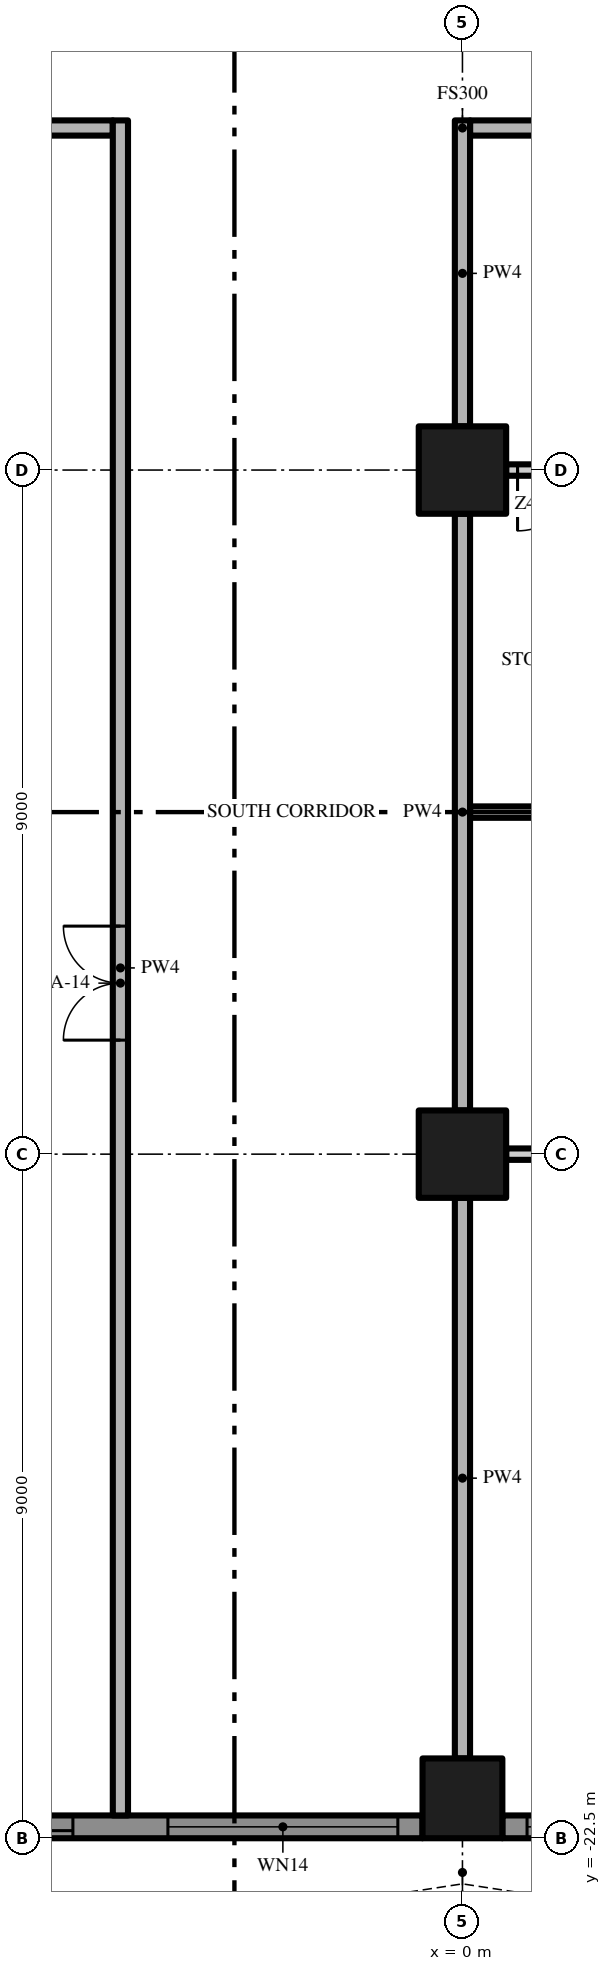
"""IFC4 building model, lengths in metres.
Left out: names, types, materials, properties, quantities, classifications, styles, units other than length and angle.
Written with IfcOpenShell. Run it as: python <this file> out.ifc"""

import sys

from ifc_helpers import new_model, si_unit, direction, frame, frame_2d, origin, origin_2d, place, context, subcontext, project, spatial, polyline, rectangle, outline, extrude, element, fill, save


model = new_model("IFC4")
c1 = context("Model", 3, precision=1e-05, world=origin(), true_north=direction((0.0, 1.0)))
c2 = subcontext(c1, "Body", "Model", "MODEL_VIEW")
j1 = project(units=[si_unit("LENGTHUNIT", "METRE"), si_unit("PLANEANGLEUNIT", "RADIAN")], contexts=[c1])
p1 = place(None, origin())
s1 = spatial("IfcSite", under=j1, at=p1, CompositionType="ELEMENT")
p2 = place(p1, origin())
s2 = spatial("IfcBuilding", under=s1, at=p2, CompositionType="ELEMENT")
p3 = place(p2, frame((0.0, 0.0, 188.2)))
s3 = spatial("IfcBuildingStorey", under=s2, at=p3, CompositionType="ELEMENT", Elevation=188.2)
p4 = place(p3, frame((0.0, -13.5, 0.0), z_axis=(0.0, 0.0, 1.0), x_axis=(1.0, 0.0, 0.0)))
e1 = element("IfcColumn", 1, at=p4, inside=s3, PredefinedType="COLUMN", context=c2, shape_type="SweptSolid", body=[
    extrude(rectangle(XDim=1.15, YDim=1.15, at=origin_2d()), origin(), (0.0, 0.0, 1.0), 3.5),
])
p5 = place(p3, frame((0.0, -21.975, 0.0), z_axis=(0.0, 0.0, 1.0), x_axis=(1.0, 0.0, 0.0)))
e2 = element("IfcColumn", 2, at=p5, inside=s3, PredefinedType="COLUMN", context=c2, shape_type="SweptSolid", body=[
    extrude(rectangle(XDim=1.05, YDim=1.05, at=origin_2d()), origin(), (0.0, 0.0, 1.0), 3.5),
])
p6 = place(p3, frame((0.0, -4.5, 0.0), z_axis=(0.0, 0.0, 1.0), x_axis=(1.0, 0.0, 0.0)))
e3 = element("IfcColumn", 3, at=p6, inside=s3, PredefinedType="COLUMN", context=c2, shape_type="SweptSolid", body=[
    extrude(rectangle(XDim=1.15, YDim=1.15, at=origin_2d()), origin(), (0.0, 0.0, 1.0), 3.5),
])
p7 = place(p3, frame((-0.525, -22.35, 0.0), z_axis=(0.0, 0.0, 1.0), x_axis=(-1.0, 0.0, 0.0)))
e4 = element("IfcWall", 4, at=p7, inside=s3, PredefinedType="SOLIDWALL", context=c2, shape_type="SweptSolid", body=[
    extrude(rectangle(XDim=7.95, YDim=0.3, at=frame_2d((3.975, 0.0))), origin(), (0.0, 0.0, 1.0), 3.5),
])
p8 = place(p7, frame((4.6, 0.0, 0.0)))
e5 = element("IfcOpeningElement", 5, at=p8, cuts=e4, PredefinedType="OPENING", context=c2, shape_type="SweptSolid", body=[
    extrude(rectangle(XDim=3.025, YDim=2.4, at=frame_2d((1.512, 1.2))), frame((0.0, 0.16, 0.0), z_axis=(0.0, -1.0, 0.0), x_axis=(1.0, 0.0, 0.0)), (0.0, 0.0, 1.0), 0.32),
])
p9 = place(p7, frame((0.325, 0.0, 0.45)))
e6 = element("IfcOpeningElement", 6, at=p9, cuts=e4, PredefinedType="OPENING", context=c2, shape_type="SweptSolid", body=[
    extrude(rectangle(XDim=3.025, YDim=2.65, at=frame_2d((1.512, 1.325))), frame((0.0, 0.16, 0.0), z_axis=(0.0, -1.0, 0.0), x_axis=(1.0, 0.0, 0.0)), (0.0, 0.0, 1.0), 0.32),
])
p10 = place(p3, frame((8.475, -22.35, 0.0), z_axis=(0.0, 0.0, 1.0), x_axis=(-1.0, 0.0, 0.0)))
e7 = element("IfcWall", 7, at=p10, inside=s3, PredefinedType="SOLIDWALL", context=c2, shape_type="SweptSolid", body=[
    extrude(rectangle(XDim=7.95, YDim=0.3, at=frame_2d((3.975, 0.0))), origin(), (0.0, 0.0, 1.0), 3.5),
])
p11 = place(p10, frame((4.6, 0.0, 0.45)))
e8 = element("IfcOpeningElement", 8, at=p11, cuts=e7, PredefinedType="OPENING", context=c2, shape_type="SweptSolid", body=[
    extrude(rectangle(XDim=3.025, YDim=2.65, at=frame_2d((1.512, 1.325))), frame((0.0, 0.16, 0.0), z_axis=(0.0, -1.0, 0.0), x_axis=(1.0, 0.0, 0.0)), (0.0, 0.0, 1.0), 0.32),
])
p12 = place(p10, frame((0.325, 0.0, 0.0)))
e9 = element("IfcOpeningElement", 9, at=p12, cuts=e7, PredefinedType="OPENING", context=c2, shape_type="SweptSolid", body=[
    extrude(rectangle(XDim=3.025, YDim=2.4, at=frame_2d((1.512, 1.2))), frame((0.0, 0.16, 0.0), z_axis=(0.0, -1.0, 0.0), x_axis=(1.0, 0.0, 0.0)), (0.0, 0.0, 1.0), 0.32),
])
p13 = place(p3, origin())
e10 = element("IfcWall", 10, at=p13, inside=s3, PredefinedType="USERDEFINED", context=c2, shape_type="SweptSolid", body=[
    extrude(outline(polyline([(-22.5, -25.5), (-21.0, -25.271), (-19.5, -24.671), (-18.0, -23.929), (-16.5, -23.329), (-15.0, -23.1), (-13.5, -23.329), (-12.0, -23.929), (-10.5, -24.671), (-9.0, -25.271), (-7.5, -25.5), (-6.0, -25.271), (-4.5, -24.671), (-3.0, -23.929), (-1.5, -23.329), (0.0, -23.1), (1.5, -23.329), (3.0, -23.929), (4.5, -24.671), (6.0, -25.271), (7.5, -25.5), (9.0, -25.271), (10.5, -24.671), (12.0, -23.929), (13.5, -23.329), (15.0, -23.1), (16.5, -23.329), (18.0, -23.929), (19.5, -24.671), (21.0, -25.271), (22.5, -25.5), (22.538, -25.253), (21.066, -25.028), (19.602, -24.442), (18.102, -23.701), (16.566, -23.086), (15.0, -22.847), (13.434, -23.086), (11.898, -23.701), (10.398, -24.442), (8.934, -25.028), (7.5, -25.247), (6.066, -25.028), (4.602, -24.442), (3.102, -23.701), (1.566, -23.086), (0.0, -22.847), (-1.566, -23.086), (-3.102, -23.701), (-4.602, -24.442), (-6.066, -25.028), (-7.5, -25.247), (-8.934, -25.028), (-10.398, -24.442), (-11.898, -23.701), (-13.434, -23.086), (-15.0, -22.847), (-16.566, -23.086), (-18.102, -23.701), (-19.602, -24.442), (-21.066, -25.028), (-22.538, -25.253), (-22.5, -25.5)])), origin(), (0.0, 0.0, 1.0), 0.9),
])
p14 = place(p3, frame((8.425, -13.5, 0.0), z_axis=(0.0, 0.0, 1.0), x_axis=(-1.0, 0.0, 0.0)))
e11 = element("IfcWall", 11, at=p14, inside=s3, PredefinedType="PARTITIONING", context=c2, shape_type="SweptSolid", body=[
    extrude(rectangle(XDim=7.85, YDim=0.15, at=frame_2d((3.925, 0.0))), origin(), (0.0, 0.0, 1.0), 3.5),
])
p15 = place(p14, frame((4.15, 0.0, 0.0)))
e12 = element("IfcOpeningElement", 12, at=p15, cuts=e11, PredefinedType="OPENING", context=c2, shape_type="SweptSolid", body=[
    extrude(rectangle(XDim=1.8, YDim=2.4, at=frame_2d((0.9, 1.2))), frame((0.0, 0.085, 0.0), z_axis=(0.0, -1.0, 0.0), x_axis=(1.0, 0.0, 0.0)), (0.0, 0.0, 1.0), 0.17),
])
p16 = place(p3, frame((0.1, -9.0, 0.0), z_axis=(0.0, 0.0, 1.0), x_axis=(1.0, 0.0, 0.0)))
e13 = element("IfcWall", 13, at=p16, inside=s3, PredefinedType="PARTITIONING", context=c2, shape_type="SweptSolid", body=[
    extrude(rectangle(XDim=13.4, YDim=0.15, at=frame_2d((6.7, 0.0))), origin(), (0.0, 0.0, 1.0), 3.5),
])
p17 = place(p16, frame((6.9, 0.0, 0.0)))
e14 = element("IfcOpeningElement", 14, at=p17, cuts=e13, PredefinedType="OPENING", context=c2, shape_type="SweptSolid", body=[
    extrude(rectangle(XDim=1.0, YDim=2.4, at=frame_2d((0.5, 1.2))), frame((0.0, 0.085, 0.0), z_axis=(0.0, -1.0, 0.0), x_axis=(1.0, 0.0, 0.0)), (0.0, 0.0, 1.0), 0.17),
])
p18 = place(p3, frame((8.425, -4.5, 0.0), z_axis=(0.0, 0.0, 1.0), x_axis=(-1.0, 0.0, 0.0)))
e15 = element("IfcWall", 15, at=p18, inside=s3, PredefinedType="PARTITIONING", context=c2, shape_type="SweptSolid", body=[
    extrude(rectangle(XDim=7.85, YDim=0.15, at=frame_2d((3.925, 0.0))), origin(), (0.0, 0.0, 1.0), 3.5),
])
p19 = place(p18, frame((6.9, 0.0, 0.0)))
e16 = element("IfcOpeningElement", 16, at=p19, cuts=e15, PredefinedType="OPENING", context=c2, shape_type="SweptSolid", body=[
    extrude(rectangle(XDim=0.8, YDim=2.0, at=frame_2d((0.4, 1.0))), frame((0.0, 0.085, 0.0), z_axis=(0.0, -1.0, 0.0), x_axis=(1.0, 0.0, 0.0)), (0.0, 0.0, 1.0), 0.17),
])
p20 = place(p18, frame((4.875, 0.0, 0.0)))
e17 = element("IfcOpeningElement", 17, at=p20, cuts=e15, PredefinedType="OPENING", context=c2, shape_type="SweptSolid", body=[
    extrude(rectangle(XDim=0.8, YDim=2.0, at=frame_2d((0.4, 1.0))), frame((0.0, 0.085, 0.0), z_axis=(0.0, -1.0, 0.0), x_axis=(1.0, 0.0, 0.0)), (0.0, 0.0, 1.0), 0.17),
])
p21 = place(p3, frame((-17.4, 0.0, 0.0), z_axis=(0.0, 0.0, 1.0), x_axis=(1.0, 0.0, 0.0)))
e18 = element("IfcWall", 18, at=p21, inside=s3, PredefinedType="PARTITIONING", context=c2, shape_type="SweptSolid", body=[
    extrude(rectangle(XDim=12.8, YDim=0.2, at=frame_2d((6.4, 0.0))), origin(), (0.0, 0.0, 1.0), 3.5),
])
p22 = place(p3, frame((17.4, 0.0, 0.0), z_axis=(0.0, 0.0, 1.0), x_axis=(-1.0, 0.0, 0.0)))
e19 = element("IfcWall", 19, at=p22, inside=s3, PredefinedType="PARTITIONING", context=c2, shape_type="SweptSolid", body=[
    extrude(rectangle(XDim=17.3, YDim=0.2, at=frame_2d((8.65, 0.0))), origin(), (0.0, 0.0, 1.0), 3.5),
])
p23 = place(p22, frame((7.65, 0.0, 0.0)))
e20 = element("IfcOpeningElement", 20, at=p23, cuts=e19, PredefinedType="OPENING", context=c2, shape_type="SweptSolid", body=[
    extrude(rectangle(XDim=1.5, YDim=2.4, at=frame_2d((0.75, 1.2))), frame((0.0, 0.11, 0.0), z_axis=(0.0, -1.0, 0.0), x_axis=(1.0, 0.0, 0.0)), (0.0, 0.0, 1.0), 0.22),
])
p24 = place(p3, frame((-4.5, -22.2, 0.0), z_axis=(0.0, 0.0, 1.0), x_axis=(0.0, 1.0, 0.0)))
e21 = element("IfcWall", 21, at=p24, inside=s3, PredefinedType="PARTITIONING", context=c2, shape_type="SweptSolid", body=[
    extrude(rectangle(XDim=22.3, YDim=0.2, at=frame_2d((11.15, 0.0))), origin(), (0.0, 0.0, 1.0), 3.5),
])
p25 = place(p24, frame((10.2, 0.0, 0.0)))
e22 = element("IfcOpeningElement", 22, at=p25, cuts=e21, PredefinedType="OPENING", context=c2, shape_type="SweptSolid", body=[
    extrude(rectangle(XDim=1.5, YDim=2.4, at=frame_2d((0.75, 1.2))), frame((0.0, 0.11, 0.0), z_axis=(0.0, -1.0, 0.0), x_axis=(1.0, 0.0, 0.0)), (0.0, 0.0, 1.0), 0.22),
])
p26 = place(p3, frame((0.0, -21.45, 0.0), z_axis=(0.0, 0.0, 1.0), x_axis=(0.0, 1.0, 0.0)))
e23 = element("IfcWall", 23, at=p26, inside=s3, PredefinedType="PARTITIONING", context=c2, shape_type="SweptSolid", body=[
    extrude(rectangle(XDim=7.375, YDim=0.2, at=frame_2d((3.688, 0.0))), origin(), (0.0, 0.0, 1.0), 3.5),
])
p27 = place(p3, frame((0.0, -12.925, 0.0), z_axis=(0.0, 0.0, 1.0), x_axis=(0.0, 1.0, 0.0)))
e24 = element("IfcWall", 24, at=p27, inside=s3, PredefinedType="PARTITIONING", context=c2, shape_type="SweptSolid", body=[
    extrude(rectangle(XDim=7.85, YDim=0.2, at=frame_2d((3.925, 0.0))), origin(), (0.0, 0.0, 1.0), 3.5),
])
p28 = place(p3, frame((0.0, -3.925, 0.0), z_axis=(0.0, 0.0, 1.0), x_axis=(0.0, 1.0, 0.0)))
e25 = element("IfcWall", 25, at=p28, inside=s3, PredefinedType="PARTITIONING", context=c2, shape_type="SweptSolid", body=[
    extrude(rectangle(XDim=4.025, YDim=0.2, at=frame_2d((2.013, 0.0))), origin(), (0.0, 0.0, 1.0), 3.5),
])
p29 = place(p8, origin())
e26 = element("IfcDoor", 26, at=p29, inside=s3, OperationType="SINGLE_SWING_LEFT", PredefinedType="DOOR", context=c2, shape_type="SweptSolid", body=[
    extrude(rectangle(XDim=3.025, YDim=2.4, at=frame_2d((1.512, 1.2))), frame((0.0, 0.025, 0.0), z_axis=(0.0, -1.0, 0.0), x_axis=(1.0, 0.0, 0.0)), (0.0, 0.0, 1.0), 0.05),
])
fill(e5, e26)
p30 = place(p9, origin())
e27 = element("IfcWindow", 27, at=p30, inside=s3, PartitioningType="SINGLE_PANEL", PredefinedType="WINDOW", context=c2, shape_type="SweptSolid", body=[
    extrude(rectangle(XDim=3.025, YDim=2.65, at=frame_2d((1.512, 1.325))), frame((0.0, 0.03, 0.0), z_axis=(0.0, -1.0, 0.0), x_axis=(1.0, 0.0, 0.0)), (0.0, 0.0, 1.0), 0.06),
])
fill(e6, e27)
p31 = place(p11, origin())
e28 = element("IfcWindow", 28, at=p31, inside=s3, PartitioningType="SINGLE_PANEL", PredefinedType="WINDOW", context=c2, shape_type="SweptSolid", body=[
    extrude(rectangle(XDim=3.025, YDim=2.65, at=frame_2d((1.512, 1.325))), frame((0.0, 0.03, 0.0), z_axis=(0.0, -1.0, 0.0), x_axis=(1.0, 0.0, 0.0)), (0.0, 0.0, 1.0), 0.06),
])
fill(e8, e28)
p32 = place(p25, origin())
e29 = element("IfcDoor", 29, at=p32, inside=s3, OperationType="DOUBLE_DOOR_SINGLE_SWING", PredefinedType="DOOR", context=c2, shape_type="SweptSolid", body=[
    extrude(rectangle(XDim=1.5, YDim=2.4, at=frame_2d((0.75, 1.2))), frame((0.0, 0.025, 0.0), z_axis=(0.0, -1.0, 0.0), x_axis=(1.0, 0.0, 0.0)), (0.0, 0.0, 1.0), 0.05),
])
fill(e22, e29)
p33 = place(p19, origin())
e30 = element("IfcDoor", 30, at=p33, inside=s3, OperationType="SINGLE_SWING_RIGHT", PredefinedType="DOOR", context=c2, shape_type="SweptSolid", body=[
    extrude(rectangle(XDim=0.8, YDim=2.0, at=frame_2d((0.4, 1.0))), frame((0.0, 0.025, 0.0), z_axis=(0.0, -1.0, 0.0), x_axis=(1.0, 0.0, 0.0)), (0.0, 0.0, 1.0), 0.05),
])
fill(e16, e30)
save(model, sys.argv[1])
